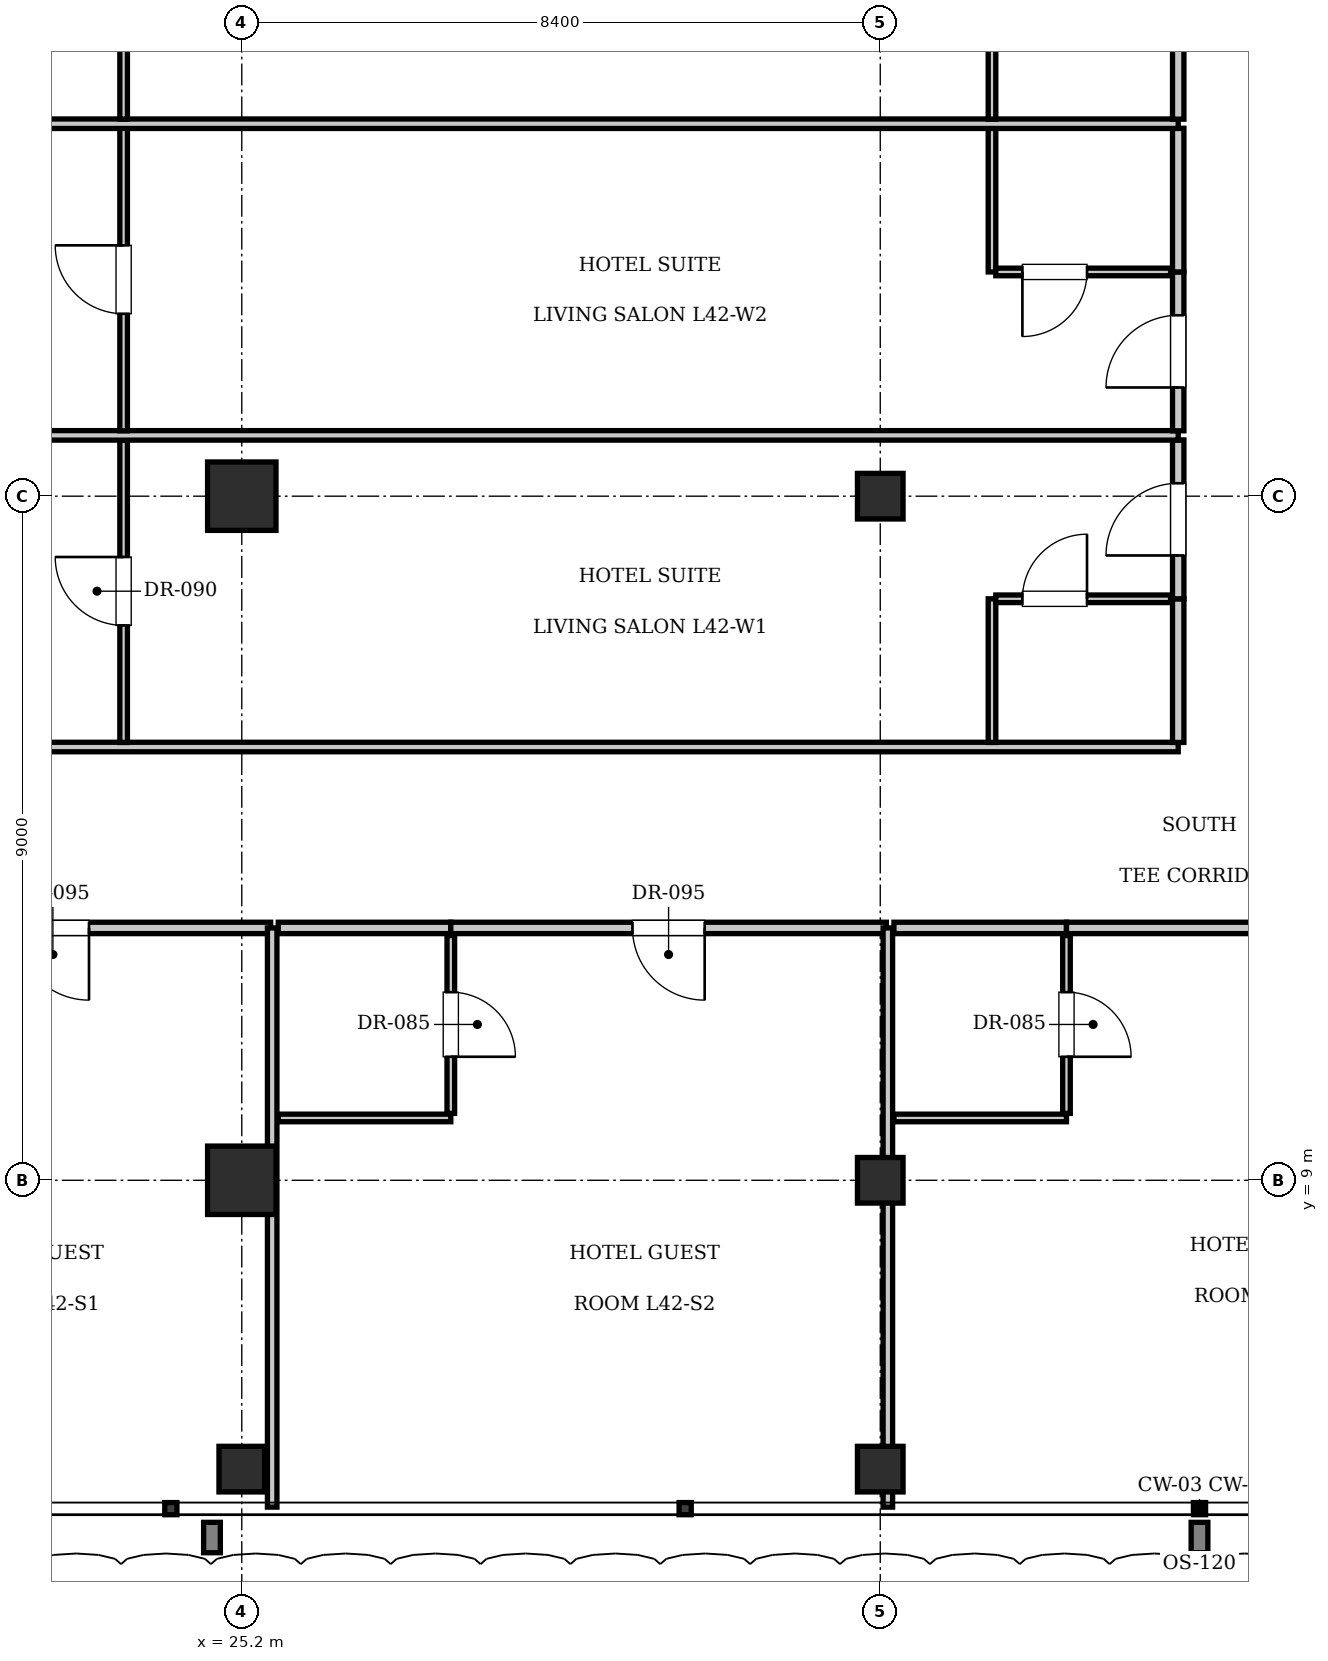
"""IFC4 building model, lengths in metres.
Left out: names, types, materials, properties, quantities, classifications, styles, units other than length and angle.
Written with IfcOpenShell. Run it as: python <this file> out.ifc"""

import sys

from ifc_helpers import new_model, si_unit, direction, frame, frame_2d, origin, origin_2d, place, context, subcontext, project, spatial, rectangle, i_section, extrude, element, fill, save


model = new_model("IFC4")
c1 = context("Model", 3, precision=1e-05, world=origin(), true_north=direction((0.0, 1.0)))
c2 = subcontext(c1, "Body", "Model", "MODEL_VIEW")
j1 = project(units=[si_unit("LENGTHUNIT", "METRE"), si_unit("PLANEANGLEUNIT", "RADIAN")], contexts=[c1])
p1 = place(None, origin())
s1 = spatial("IfcSite", under=j1, at=p1, CompositionType="ELEMENT")
p2 = place(p1, origin())
s2 = spatial("IfcBuilding", under=s1, at=p2, CompositionType="ELEMENT")
p3 = place(p2, frame((0.0, 0.0, 173.6)))
s3 = spatial("IfcBuildingStorey", under=s2, at=p3, CompositionType="ELEMENT", Elevation=173.6)
for number, where, z_axis, x_axis in (
    (1, (25.2, 18.0, 0.0), (0.0, 0.0, 1.0), (1.0, 0.0, 0.0)),
    (2, (25.2, 9.0, 0.0), (0.0, 0.0, 1.0), (1.0, 0.0, 0.0)),
):
    element("IfcColumn", number, at=place(p3, frame(where, z_axis=z_axis, x_axis=x_axis)), inside=s3, PredefinedType="COLUMN", context=c2, shape_type="SweptSolid", body=[
        extrude(rectangle(XDim=0.9, YDim=0.9, at=origin_2d()), origin(), (0.0, 0.0, 1.0), 3.85),
    ])
for number, where, z_axis, x_axis in (
    (3, (33.6, 9.0, 0.0), (0.0, 0.0, 1.0), (1.0, 0.0, 0.0)),
    (4, (33.6, 18.0, 0.0), (0.0, 0.0, 1.0), (1.0, 0.0, 0.0)),
    (5, (25.2, 5.2, 0.0), (0.0, 0.0, 1.0), (1.0, 0.0, 0.0)),
    (6, (33.6, 5.2, 0.0), (0.0, 0.0, 1.0), (1.0, 0.0, 0.0)),
):
    element("IfcColumn", number, at=place(p3, frame(where, z_axis=z_axis, x_axis=x_axis)), inside=s3, PredefinedType="COLUMN", context=c2, shape_type="SweptSolid", body=[
        extrude(i_section(OverallWidth=0.6, OverallDepth=0.6, WebThickness=0.025, FlangeThickness=0.038, at=origin_2d()), origin(), (0.0, 0.0, 1.0), 3.85),
    ])
p4 = place(p3, frame((19.85, 12.32, 0.0), z_axis=(0.0, 0.0, 1.0), x_axis=(1.0, 0.0, 0.0)))
e7 = element("IfcWall", 7, at=p4, inside=s3, PredefinedType="PARTITIONING", context=c2, shape_type="SweptSolid", body=[
    extrude(rectangle(XDim=5.73, YDim=0.15, at=frame_2d((2.865, 0.0))), origin(), (0.0, 0.0, 1.0), 3.61),
])
p5 = place(p4, frame((2.39, 0.0, 0.0)))
e8 = element("IfcOpeningElement", 8, at=p5, cuts=e7, PredefinedType="OPENING", context=c2, shape_type="SweptSolid", body=[
    extrude(rectangle(XDim=0.95, YDim=2.15, at=frame_2d((0.475, 1.075))), frame((0.0, 0.085, 0.0), z_axis=(0.0, -1.0, 0.0), x_axis=(1.0, 0.0, 0.0)), (0.0, 0.0, 1.0), 0.17),
])
p6 = place(p3, frame((25.6, 4.7, 0.0), z_axis=(0.0, 0.0, 1.0), x_axis=(0.0, 1.0, 0.0)))
e9 = element("IfcWall", 9, at=p6, inside=s3, PredefinedType="PARTITIONING", context=c2, shape_type="SweptSolid", body=[
    extrude(rectangle(XDim=7.62, YDim=0.125, at=frame_2d((3.81, 0.0))), origin(), (0.0, 0.0, 1.0), 3.61),
])
p7 = place(p3, frame((25.68, 12.32, 0.0), z_axis=(0.0, 0.0, 1.0), x_axis=(1.0, 0.0, 0.0)))
e10 = element("IfcWall", 10, at=p7, inside=s3, PredefinedType="PARTITIONING", context=c2, shape_type="SweptSolid", body=[
    extrude(rectangle(XDim=2.27, YDim=0.15, at=frame_2d((1.135, 0.0))), origin(), (0.0, 0.0, 1.0), 3.61),
])
p8 = place(p3, frame((25.68, 9.82, 0.0), z_axis=(0.0, 0.0, 1.0), x_axis=(1.0, 0.0, 0.0)))
e11 = element("IfcWall", 11, at=p8, inside=s3, PredefinedType="PARTITIONING", context=c2, shape_type="SweptSolid", body=[
    extrude(rectangle(XDim=2.27, YDim=0.1, at=frame_2d((1.135, 0.0))), origin(), (0.0, 0.0, 1.0), 3.61),
])
p9 = place(p3, frame((27.95, 9.88, 0.0), z_axis=(0.0, 0.0, 1.0), x_axis=(0.0, 1.0, 0.0)))
e12 = element("IfcWall", 12, at=p9, inside=s3, PredefinedType="PARTITIONING", context=c2, shape_type="SweptSolid", body=[
    extrude(rectangle(XDim=2.34, YDim=0.1, at=frame_2d((1.17, 0.0))), origin(), (0.0, 0.0, 1.0), 3.61),
])
p10 = place(p9, frame((0.745, 0.0, 0.0)))
e13 = element("IfcOpeningElement", 13, at=p10, cuts=e12, PredefinedType="OPENING", context=c2, shape_type="SweptSolid", body=[
    extrude(rectangle(XDim=0.85, YDim=2.1, at=frame_2d((0.425, 1.05))), frame((0.0, 0.06, 0.0), z_axis=(0.0, -1.0, 0.0), x_axis=(1.0, 0.0, 0.0)), (0.0, 0.0, 1.0), 0.12),
])
p11 = place(p3, frame((27.95, 12.32, 0.0), z_axis=(0.0, 0.0, 1.0), x_axis=(1.0, 0.0, 0.0)))
e14 = element("IfcWall", 14, at=p11, inside=s3, PredefinedType="PARTITIONING", context=c2, shape_type="SweptSolid", body=[
    extrude(rectangle(XDim=5.73, YDim=0.15, at=frame_2d((2.865, 0.0))), origin(), (0.0, 0.0, 1.0), 3.61),
])
p12 = place(p11, frame((2.39, 0.0, 0.0)))
e15 = element("IfcOpeningElement", 15, at=p12, cuts=e14, PredefinedType="OPENING", context=c2, shape_type="SweptSolid", body=[
    extrude(rectangle(XDim=0.95, YDim=2.15, at=frame_2d((0.475, 1.075))), frame((0.0, 0.085, 0.0), z_axis=(0.0, -1.0, 0.0), x_axis=(1.0, 0.0, 0.0)), (0.0, 0.0, 1.0), 0.17),
])
p13 = place(p3, frame((33.7, 4.7, 0.0), z_axis=(0.0, 0.0, 1.0), x_axis=(0.0, 1.0, 0.0)))
e16 = element("IfcWall", 16, at=p13, inside=s3, PredefinedType="PARTITIONING", context=c2, shape_type="SweptSolid", body=[
    extrude(rectangle(XDim=7.62, YDim=0.125, at=frame_2d((3.81, 0.0))), origin(), (0.0, 0.0, 1.0), 3.007),
])
p14 = place(p3, frame((33.78, 12.32, 0.0), z_axis=(0.0, 0.0, 1.0), x_axis=(1.0, 0.0, 0.0)))
e17 = element("IfcWall", 17, at=p14, inside=s3, PredefinedType="PARTITIONING", context=c2, shape_type="SweptSolid", body=[
    extrude(rectangle(XDim=2.27, YDim=0.15, at=frame_2d((1.135, 0.0))), origin(), (0.0, 0.0, 1.0), 3.61),
])
p15 = place(p3, frame((33.78, 9.82, 0.0), z_axis=(0.0, 0.0, 1.0), x_axis=(1.0, 0.0, 0.0)))
e18 = element("IfcWall", 18, at=p15, inside=s3, PredefinedType="PARTITIONING", context=c2, shape_type="SweptSolid", body=[
    extrude(rectangle(XDim=2.27, YDim=0.1, at=frame_2d((1.135, 0.0))), origin(), (0.0, 0.0, 1.0), 3.61),
])
p16 = place(p3, frame((36.05, 9.88, 0.0), z_axis=(0.0, 0.0, 1.0), x_axis=(0.0, 1.0, 0.0)))
e19 = element("IfcWall", 19, at=p16, inside=s3, PredefinedType="PARTITIONING", context=c2, shape_type="SweptSolid", body=[
    extrude(rectangle(XDim=2.34, YDim=0.1, at=frame_2d((1.17, 0.0))), origin(), (0.0, 0.0, 1.0), 3.61),
])
p17 = place(p16, frame((0.745, 0.0, 0.0)))
e20 = element("IfcOpeningElement", 20, at=p17, cuts=e19, PredefinedType="OPENING", context=c2, shape_type="SweptSolid", body=[
    extrude(rectangle(XDim=0.85, YDim=2.1, at=frame_2d((0.425, 1.05))), frame((0.0, 0.06, 0.0), z_axis=(0.0, -1.0, 0.0), x_axis=(1.0, 0.0, 0.0)), (0.0, 0.0, 1.0), 0.12),
])
p18 = place(p3, frame((36.05, 12.32, 0.0), z_axis=(0.0, 0.0, 1.0), x_axis=(1.0, 0.0, 0.0)))
e21 = element("IfcWall", 21, at=p18, inside=s3, PredefinedType="PARTITIONING", context=c2, shape_type="SweptSolid", body=[
    extrude(rectangle(XDim=5.83, YDim=0.15, at=frame_2d((2.915, 0.0))), origin(), (0.0, 0.0, 1.0), 3.61),
])
p19 = place(p18, frame((2.44, 0.0, 0.0)))
e22 = element("IfcOpeningElement", 22, at=p19, cuts=e21, PredefinedType="OPENING", context=c2, shape_type="SweptSolid", body=[
    extrude(rectangle(XDim=0.95, YDim=2.15, at=frame_2d((0.475, 1.075))), frame((0.0, 0.085, 0.0), z_axis=(0.0, -1.0, 0.0), x_axis=(1.0, 0.0, 0.0)), (0.0, 0.0, 1.0), 0.17),
])
p20 = place(p3, frame((13.2, 14.7, 0.0), z_axis=(0.0, 0.0, 1.0), x_axis=(1.0, 0.0, 0.0)))
e23 = element("IfcWall", 23, at=p20, inside=s3, PredefinedType="PARTITIONING", context=c2, shape_type="SweptSolid", body=[
    extrude(rectangle(XDim=24.32, YDim=0.125, at=frame_2d((12.16, 0.0))), origin(), (0.0, 0.0, 1.0), 3.61),
])
p21 = place(p3, frame((37.52, 14.76, 0.0), z_axis=(0.0, 0.0, 1.0), x_axis=(0.0, 1.0, 0.0)))
e24 = element("IfcWall", 24, at=p21, inside=s3, PredefinedType="PARTITIONING", context=c2, shape_type="SweptSolid", body=[
    extrude(rectangle(XDim=1.89, YDim=0.15, at=frame_2d((0.945, 0.0))), origin(), (0.0, 0.0, 1.0), 3.61),
])
p22 = place(p3, frame((37.52, 16.65, 0.0), z_axis=(0.0, 0.0, 1.0), x_axis=(0.0, 1.0, 0.0)))
e25 = element("IfcWall", 25, at=p22, inside=s3, PredefinedType="PARTITIONING", context=c2, shape_type="SweptSolid", body=[
    extrude(rectangle(XDim=2.09, YDim=0.15, at=frame_2d((1.045, 0.0))), origin(), (0.0, 0.0, 1.0), 3.61),
])
p23 = place(p22, frame((0.57, 0.0, 0.0)))
e26 = element("IfcOpeningElement", 26, at=p23, cuts=e25, PredefinedType="OPENING", context=c2, shape_type="SweptSolid", body=[
    extrude(rectangle(XDim=0.95, YDim=2.15, at=frame_2d((0.475, 1.075))), frame((0.0, 0.085, 0.0), z_axis=(0.0, -1.0, 0.0), x_axis=(1.0, 0.0, 0.0)), (0.0, 0.0, 1.0), 0.17),
])
p24 = place(p3, frame((35.07, 14.76, 0.0), z_axis=(0.0, 0.0, 1.0), x_axis=(0.0, 1.0, 0.0)))
e27 = element("IfcWall", 27, at=p24, inside=s3, PredefinedType="PARTITIONING", context=c2, shape_type="SweptSolid", body=[
    extrude(rectangle(XDim=1.89, YDim=0.1, at=frame_2d((0.945, 0.0))), origin(), (0.0, 0.0, 1.0), 3.61),
])
p25 = place(p3, frame((35.12, 16.65, 0.0), z_axis=(0.0, 0.0, 1.0), x_axis=(1.0, 0.0, 0.0)))
e28 = element("IfcWall", 28, at=p25, inside=s3, PredefinedType="PARTITIONING", context=c2, shape_type="SweptSolid", body=[
    extrude(rectangle(XDim=2.3, YDim=0.1, at=frame_2d((1.15, 0.0))), origin(), (0.0, 0.0, 1.0), 3.61),
])
p26 = place(p25, frame((0.35, 0.0, 0.0)))
e29 = element("IfcOpeningElement", 29, at=p26, cuts=e28, PredefinedType="OPENING", context=c2, shape_type="SweptSolid", body=[
    extrude(rectangle(XDim=0.85, YDim=2.1, at=frame_2d((0.425, 1.05))), frame((0.0, 0.06, 0.0), z_axis=(0.0, -1.0, 0.0), x_axis=(1.0, 0.0, 0.0)), (0.0, 0.0, 1.0), 0.12),
])
p27 = place(p3, frame((23.646, 14.76, 0.0), z_axis=(0.0, 0.0, 1.0), x_axis=(0.0, 1.0, 0.0)))
e30 = element("IfcWall", 30, at=p27, inside=s3, PredefinedType="PARTITIONING", context=c2, shape_type="SweptSolid", body=[
    extrude(rectangle(XDim=3.98, YDim=0.1, at=frame_2d((1.99, 0.0))), origin(), (0.0, 0.0, 1.0), 3.61),
])
p28 = place(p27, frame((1.54, 0.0, 0.0)))
e31 = element("IfcOpeningElement", 31, at=p28, cuts=e30, PredefinedType="OPENING", context=c2, shape_type="SweptSolid", body=[
    extrude(rectangle(XDim=0.9, YDim=2.1, at=frame_2d((0.45, 1.05))), frame((0.0, 0.06, 0.0), z_axis=(0.0, -1.0, 0.0), x_axis=(1.0, 0.0, 0.0)), (0.0, 0.0, 1.0), 0.12),
])
p29 = place(p3, frame((13.2, 18.8, 0.0), z_axis=(0.0, 0.0, 1.0), x_axis=(1.0, 0.0, 0.0)))
e32 = element("IfcWall", 32, at=p29, inside=s3, PredefinedType="PARTITIONING", context=c2, shape_type="SweptSolid", body=[
    extrude(rectangle(XDim=24.32, YDim=0.125, at=frame_2d((12.16, 0.0))), origin(), (0.0, 0.0, 1.0), 3.61),
])
p30 = place(p3, frame((37.52, 18.86, 0.0), z_axis=(0.0, 0.0, 1.0), x_axis=(0.0, 1.0, 0.0)))
e33 = element("IfcWall", 33, at=p30, inside=s3, PredefinedType="PARTITIONING", context=c2, shape_type="SweptSolid", body=[
    extrude(rectangle(XDim=2.09, YDim=0.15, at=frame_2d((1.045, 0.0))), origin(), (0.0, 0.0, 1.0), 3.61),
])
p31 = place(p30, frame((0.57, 0.0, 0.0)))
e34 = element("IfcOpeningElement", 34, at=p31, cuts=e33, PredefinedType="OPENING", context=c2, shape_type="SweptSolid", body=[
    extrude(rectangle(XDim=0.95, YDim=2.15, at=frame_2d((0.475, 1.075))), frame((0.0, 0.085, 0.0), z_axis=(0.0, -1.0, 0.0), x_axis=(1.0, 0.0, 0.0)), (0.0, 0.0, 1.0), 0.17),
])
p32 = place(p3, frame((37.52, 20.95, 0.0), z_axis=(0.0, 0.0, 1.0), x_axis=(0.0, 1.0, 0.0)))
e35 = element("IfcWall", 35, at=p32, inside=s3, PredefinedType="PARTITIONING", context=c2, shape_type="SweptSolid", body=[
    extrude(rectangle(XDim=1.89, YDim=0.15, at=frame_2d((0.945, 0.0))), origin(), (0.0, 0.0, 1.0), 3.61),
])
p33 = place(p3, frame((35.07, 20.95, 0.0), z_axis=(0.0, 0.0, 1.0), x_axis=(0.0, 1.0, 0.0)))
e36 = element("IfcWall", 36, at=p33, inside=s3, PredefinedType="PARTITIONING", context=c2, shape_type="SweptSolid", body=[
    extrude(rectangle(XDim=1.89, YDim=0.1, at=frame_2d((0.945, 0.0))), origin(), (0.0, 0.0, 1.0), 3.61),
])
p34 = place(p3, frame((35.12, 20.95, 0.0), z_axis=(0.0, 0.0, 1.0), x_axis=(1.0, 0.0, 0.0)))
e37 = element("IfcWall", 37, at=p34, inside=s3, PredefinedType="PARTITIONING", context=c2, shape_type="SweptSolid", body=[
    extrude(rectangle(XDim=2.3, YDim=0.1, at=frame_2d((1.15, 0.0))), origin(), (0.0, 0.0, 1.0), 3.61),
])
p35 = place(p34, frame((0.35, 0.0, 0.0)))
e38 = element("IfcOpeningElement", 38, at=p35, cuts=e37, PredefinedType="OPENING", context=c2, shape_type="SweptSolid", body=[
    extrude(rectangle(XDim=0.85, YDim=2.1, at=frame_2d((0.425, 1.05))), frame((0.0, 0.06, 0.0), z_axis=(0.0, -1.0, 0.0), x_axis=(1.0, 0.0, 0.0)), (0.0, 0.0, 1.0), 0.12),
])
p36 = place(p3, frame((23.646, 18.86, 0.0), z_axis=(0.0, 0.0, 1.0), x_axis=(0.0, 1.0, 0.0)))
e39 = element("IfcWall", 39, at=p36, inside=s3, PredefinedType="PARTITIONING", context=c2, shape_type="SweptSolid", body=[
    extrude(rectangle(XDim=3.98, YDim=0.1, at=frame_2d((1.99, 0.0))), origin(), (0.0, 0.0, 1.0), 3.61),
])
p37 = place(p36, frame((1.54, 0.0, 0.0)))
e40 = element("IfcOpeningElement", 40, at=p37, cuts=e39, PredefinedType="OPENING", context=c2, shape_type="SweptSolid", body=[
    extrude(rectangle(XDim=0.9, YDim=2.1, at=frame_2d((0.45, 1.05))), frame((0.0, 0.06, 0.0), z_axis=(0.0, -1.0, 0.0), x_axis=(1.0, 0.0, 0.0)), (0.0, 0.0, 1.0), 0.12),
])
p38 = place(p3, frame((13.2, 22.9, 0.0), z_axis=(0.0, 0.0, 1.0), x_axis=(1.0, 0.0, 0.0)))
e41 = element("IfcWall", 41, at=p38, inside=s3, PredefinedType="PARTITIONING", context=c2, shape_type="SweptSolid", body=[
    extrude(rectangle(XDim=24.32, YDim=0.125, at=frame_2d((12.16, 0.0))), origin(), (0.0, 0.0, 1.0), 3.61),
])
p39 = place(p3, frame((37.52, 22.96, 0.0), z_axis=(0.0, 0.0, 1.0), x_axis=(0.0, 1.0, 0.0)))
e42 = element("IfcWall", 42, at=p39, inside=s3, PredefinedType="PARTITIONING", context=c2, shape_type="SweptSolid", body=[
    extrude(rectangle(XDim=1.89, YDim=0.15, at=frame_2d((0.945, 0.0))), origin(), (0.0, 0.0, 1.0), 3.61),
])
p40 = place(p3, frame((35.07, 22.96, 0.0), z_axis=(0.0, 0.0, 1.0), x_axis=(0.0, 1.0, 0.0)))
e43 = element("IfcWall", 43, at=p40, inside=s3, PredefinedType="PARTITIONING", context=c2, shape_type="SweptSolid", body=[
    extrude(rectangle(XDim=1.89, YDim=0.1, at=frame_2d((0.945, 0.0))), origin(), (0.0, 0.0, 1.0), 3.61),
])
p41 = place(p3, frame((23.646, 22.96, 0.0), z_axis=(0.0, 0.0, 1.0), x_axis=(0.0, 1.0, 0.0)))
e44 = element("IfcWall", 44, at=p41, inside=s3, PredefinedType="PARTITIONING", context=c2, shape_type="SweptSolid", body=[
    extrude(rectangle(XDim=3.98, YDim=0.1, at=frame_2d((1.99, 0.0))), origin(), (0.0, 0.0, 1.0), 3.61),
])
p42 = place(p41, frame((1.54, 0.0, 0.0)))
e45 = element("IfcOpeningElement", 45, at=p42, cuts=e44, PredefinedType="OPENING", context=c2, shape_type="SweptSolid", body=[
    extrude(rectangle(XDim=0.9, YDim=2.1, at=frame_2d((0.45, 1.05))), frame((0.0, 0.06, 0.0), z_axis=(0.0, -1.0, 0.0), x_axis=(1.0, 0.0, 0.0)), (0.0, 0.0, 1.0), 0.12),
])
p43 = place(p5, frame((0.95, 0.0, 0.0), z_axis=(0.0, 0.0, 1.0), x_axis=(-1.0, 0.0, 0.0)))
e46 = element("IfcDoor", 46, at=p43, inside=s3, OperationType="SINGLE_SWING_LEFT", PredefinedType="DOOR", context=c2, shape_type="SweptSolid", body=[
    extrude(rectangle(XDim=0.95, YDim=2.15, at=frame_2d((0.475, 1.075))), frame((0.0, 0.025, 0.0), z_axis=(0.0, -1.0, 0.0), x_axis=(1.0, 0.0, 0.0)), (0.0, 0.0, 1.0), 0.05),
])
fill(e8, e46)
p44 = place(p10, frame((0.85, 0.0, 0.0), z_axis=(0.0, 0.0, 1.0), x_axis=(-1.0, 0.0, 0.0)))
e47 = element("IfcDoor", 47, at=p44, inside=s3, OperationType="SINGLE_SWING_RIGHT", PredefinedType="DOOR", context=c2, shape_type="SweptSolid", body=[
    extrude(rectangle(XDim=0.85, YDim=2.1, at=frame_2d((0.425, 1.05))), frame((0.0, 0.025, 0.0), z_axis=(0.0, -1.0, 0.0), x_axis=(1.0, 0.0, 0.0)), (0.0, 0.0, 1.0), 0.05),
])
fill(e13, e47)
p45 = place(p12, frame((0.95, 0.0, 0.0), z_axis=(0.0, 0.0, 1.0), x_axis=(-1.0, 0.0, 0.0)))
e48 = element("IfcDoor", 48, at=p45, inside=s3, OperationType="SINGLE_SWING_LEFT", PredefinedType="DOOR", context=c2, shape_type="SweptSolid", body=[
    extrude(rectangle(XDim=0.95, YDim=2.15, at=frame_2d((0.475, 1.075))), frame((0.0, 0.025, 0.0), z_axis=(0.0, -1.0, 0.0), x_axis=(1.0, 0.0, 0.0)), (0.0, 0.0, 1.0), 0.05),
])
fill(e15, e48)
p46 = place(p17, frame((0.85, 0.0, 0.0), z_axis=(0.0, 0.0, 1.0), x_axis=(-1.0, 0.0, 0.0)))
e49 = element("IfcDoor", 49, at=p46, inside=s3, OperationType="SINGLE_SWING_RIGHT", PredefinedType="DOOR", context=c2, shape_type="SweptSolid", body=[
    extrude(rectangle(XDim=0.85, YDim=2.1, at=frame_2d((0.425, 1.05))), frame((0.0, 0.025, 0.0), z_axis=(0.0, -1.0, 0.0), x_axis=(1.0, 0.0, 0.0)), (0.0, 0.0, 1.0), 0.05),
])
fill(e20, e49)
p47 = place(p26, origin())
e50 = element("IfcDoor", 50, at=p47, inside=s3, OperationType="SINGLE_SWING_RIGHT", PredefinedType="DOOR", context=c2, shape_type="SweptSolid", body=[
    extrude(rectangle(XDim=0.85, YDim=2.1, at=frame_2d((0.425, 1.05))), frame((0.0, 0.025, 0.0), z_axis=(0.0, -1.0, 0.0), x_axis=(1.0, 0.0, 0.0)), (0.0, 0.0, 1.0), 0.05),
])
fill(e29, e50)
p48 = place(p23, origin())
e51 = element("IfcDoor", 51, at=p48, inside=s3, OperationType="SINGLE_SWING_LEFT", PredefinedType="DOOR", context=c2, shape_type="SweptSolid", body=[
    extrude(rectangle(XDim=0.95, YDim=2.15, at=frame_2d((0.475, 1.075))), frame((0.0, 0.025, 0.0), z_axis=(0.0, -1.0, 0.0), x_axis=(1.0, 0.0, 0.0)), (0.0, 0.0, 1.0), 0.05),
])
fill(e26, e51)
p49 = place(p28, origin())
e52 = element("IfcDoor", 52, at=p49, inside=s3, OperationType="SINGLE_SWING_RIGHT", PredefinedType="DOOR", context=c2, shape_type="SweptSolid", body=[
    extrude(rectangle(XDim=0.9, YDim=2.1, at=frame_2d((0.45, 1.05))), frame((0.0, 0.025, 0.0), z_axis=(0.0, -1.0, 0.0), x_axis=(1.0, 0.0, 0.0)), (0.0, 0.0, 1.0), 0.05),
])
fill(e31, e52)
p50 = place(p35, frame((0.85, 0.0, 0.0), z_axis=(0.0, 0.0, 1.0), x_axis=(-1.0, 0.0, 0.0)))
e53 = element("IfcDoor", 53, at=p50, inside=s3, OperationType="SINGLE_SWING_RIGHT", PredefinedType="DOOR", context=c2, shape_type="SweptSolid", body=[
    extrude(rectangle(XDim=0.85, YDim=2.1, at=frame_2d((0.425, 1.05))), frame((0.0, 0.025, 0.0), z_axis=(0.0, -1.0, 0.0), x_axis=(1.0, 0.0, 0.0)), (0.0, 0.0, 1.0), 0.05),
])
fill(e38, e53)
p51 = place(p31, origin())
e54 = element("IfcDoor", 54, at=p51, inside=s3, OperationType="SINGLE_SWING_LEFT", PredefinedType="DOOR", context=c2, shape_type="SweptSolid", body=[
    extrude(rectangle(XDim=0.95, YDim=2.15, at=frame_2d((0.475, 1.075))), frame((0.0, 0.025, 0.0), z_axis=(0.0, -1.0, 0.0), x_axis=(1.0, 0.0, 0.0)), (0.0, 0.0, 1.0), 0.05),
])
fill(e34, e54)
p52 = place(p37, origin())
e55 = element("IfcDoor", 55, at=p52, inside=s3, OperationType="SINGLE_SWING_RIGHT", PredefinedType="DOOR", context=c2, shape_type="SweptSolid", body=[
    extrude(rectangle(XDim=0.9, YDim=2.1, at=frame_2d((0.45, 1.05))), frame((0.0, 0.025, 0.0), z_axis=(0.0, -1.0, 0.0), x_axis=(1.0, 0.0, 0.0)), (0.0, 0.0, 1.0), 0.05),
])
fill(e40, e55)
save(model, sys.argv[1])
